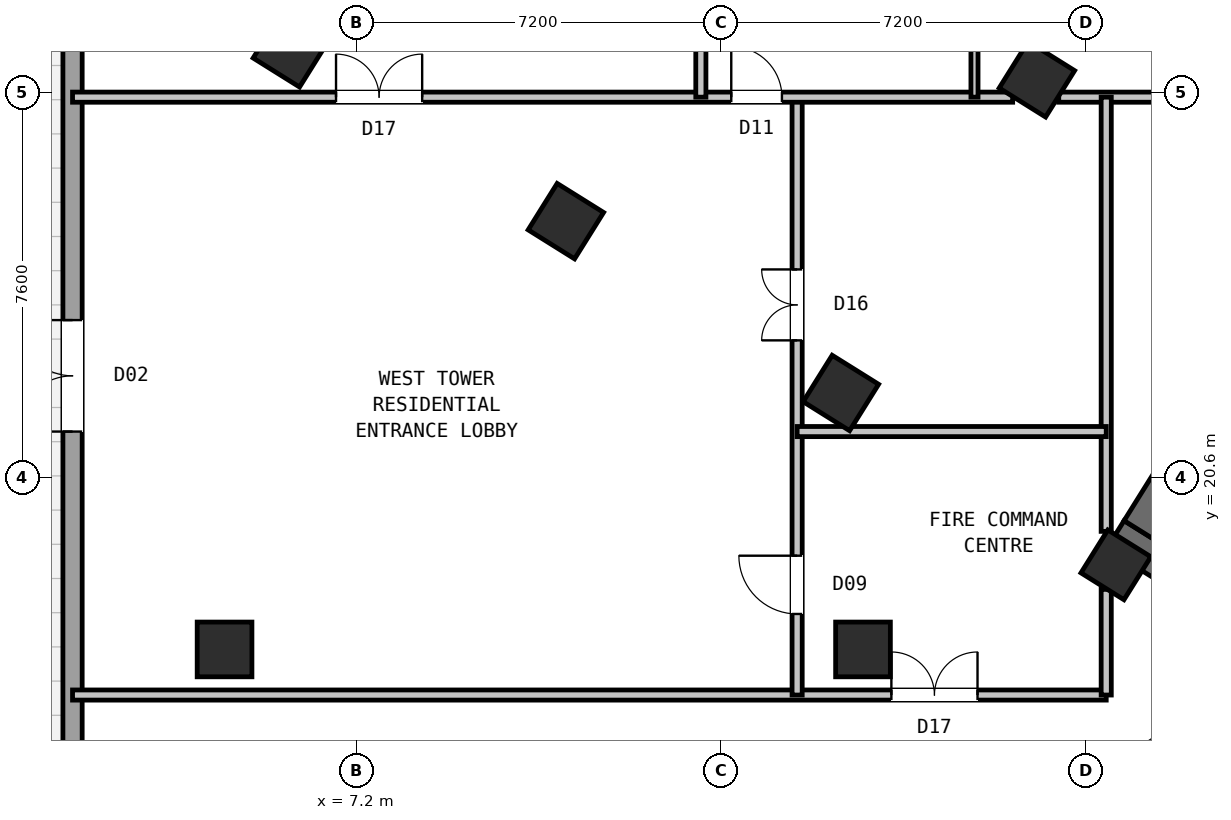
"""IFC4 building model, lengths in metres.
Left out: names, types, materials, properties, quantities, classifications, styles, units other than length and angle.
Written with IfcOpenShell. Run it as: python <this file> out.ifc"""

import sys

from ifc_helpers import new_model, si_unit, direction, frame, frame_2d, origin, origin_2d, place, context, subcontext, project, spatial, rectangle, hollow_rectangle, extrude, source, transform, mapped, element, fill, save


model = new_model("IFC4")
c1 = context("Model", 3, precision=1e-05, world=origin(), true_north=direction((0.0, 1.0)))
c2 = subcontext(c1, "Body", "Model", "MODEL_VIEW")
j1 = project(units=[si_unit("LENGTHUNIT", "METRE"), si_unit("PLANEANGLEUNIT", "RADIAN")], contexts=[c1])
p1 = place(None, origin())
s1 = spatial("IfcSite", under=j1, at=p1, CompositionType="ELEMENT")
p2 = place(p1, origin())
s2 = spatial("IfcBuilding", under=s1, at=p2, CompositionType="ELEMENT")
p3 = place(p2, origin())
s3 = spatial("IfcBuildingStorey", under=s2, at=p3, CompositionType="ELEMENT", Elevation=0.0)
p4 = place(p3, frame((33.409, 12.45, 0.0), z_axis=(0.0, 0.0, 1.0), x_axis=(-0.848051132073, 0.529914405721, 0.0)))
e1 = element("IfcWall", 1, at=p4, inside=s3, PredefinedType="SHEAR", context=c2, shape_type="SweptSolid", body=[
    extrude(rectangle(XDim=13.24, YDim=0.65, at=frame_2d((6.62, 0.0))), origin(), (0.0, 0.0, 1.0), 5.05),
])
p5 = place(p3, frame((26.007, 24.976, 0.0), z_axis=(0.0, 0.0, 1.0), x_axis=(-0.529916319127, -0.848049936456, 0.0)))
e2 = element("IfcWall", 2, at=p5, inside=s3, PredefinedType="SHEAR", context=c2, shape_type="SweptSolid", body=[
    extrude(rectangle(XDim=6.375, YDim=0.65, at=frame_2d((3.188, 0.0))), origin(), (0.0, 0.0, 1.0), 5.05),
])
m1 = source(origin(), c2, "Body", "SweptSolid", [
    extrude(hollow_rectangle(XDim=1.08, YDim=1.08, WallThickness=0.04, at=origin_2d()), origin(), (0.0, 0.0, 1.0), 5.4),
])
for number, where, z_axis, x_axis in (
    (3, (4.6, 17.2, 0.0), (0.0, 0.0, 1.0), (1.0, 0.0, 0.0)),
    (4, (17.2, 17.2, 0.0), (0.0, 0.0, 1.0), (1.0, 0.0, 0.0)),
    (5, (20.632, 28.452, 0.0), (0.0, 0.0, 1.0), (-0.848, 0.53, 0.0)),
    (6, (16.764, 22.261, 0.0), (0.0, 0.0, 1.0), (-0.848, 0.53, 0.0)),
    (7, (11.336, 25.653, 0.0), (0.0, 0.0, 1.0), (-0.848, 0.53, 0.0)),
    (8, (5.909, 29.044, 0.0), (0.0, 0.0, 1.0), (-0.848, 0.53, 0.0)),
):
    element("IfcColumn", number, at=place(p3, frame(where, z_axis=z_axis, x_axis=x_axis)), inside=s3, PredefinedType="COLUMN", context=c2, shape_type="MappedRepresentation", body=[
        mapped(m1, transform((0.0, 0.0, 0.0), scale=1.0)),
    ])
m2 = source(origin(), c2, "Body", "SweptSolid", [
    extrude(hollow_rectangle(XDim=1.0, YDim=1.0, WallThickness=0.04, at=origin_2d()), origin(), (0.0, 0.0, 1.0), 5.4),
])
p6 = place(p3, frame((22.191, 18.87, 0.0), z_axis=(0.0, 0.0, 1.0), x_axis=(-0.848048096156, 0.529919264233, 0.0)))
e9 = element("IfcColumn", 9, at=p6, inside=s3, PredefinedType="COLUMN", context=c2, shape_type="MappedRepresentation", body=[
    mapped(m2, transform((0.0, 0.0, 0.0), scale=1.0)),
])
p7 = place(p3, frame((1.6, 4.883, 0.0), z_axis=(0.0, 0.0, 1.0), x_axis=(0.0, 1.0, 0.0)))
e10 = element("IfcWall", 10, at=p7, inside=s3, PredefinedType="STANDARD", context=c2, shape_type="SweptSolid", body=[
    extrude(rectangle(XDim=38.234, YDim=0.38, at=frame_2d((19.117, 0.0))), origin(), (0.0, 0.0, 1.0), 5.05),
])
p8 = place(p7, frame((16.617, 0.0, 0.0)))
e11 = element("IfcOpeningElement", 11, at=p8, cuts=e10, PredefinedType="OPENING", context=c2, shape_type="SweptSolid", body=[
    extrude(rectangle(XDim=2.2, YDim=2.6, at=frame_2d((1.1, 1.3))), frame((0.0, 0.2, 0.0), z_axis=(0.0, -1.0, 0.0), x_axis=(1.0, 0.0, 0.0)), (0.0, 0.0, 1.0), 0.4),
])
p9 = place(p7, frame((28.317, 0.0, 0.0)))
e12 = element("IfcOpeningElement", 12, at=p9, cuts=e10, PredefinedType="OPENING", context=c2, shape_type="SweptSolid", body=[
    extrude(rectangle(XDim=1.6, YDim=2.4, at=frame_2d((0.8, 1.2))), frame((0.0, 0.2, 0.0), z_axis=(0.0, -1.0, 0.0), x_axis=(1.0, 0.0, 0.0)), (0.0, 0.0, 1.0), 0.4),
])
p10 = place(p3, frame((1.6, 16.3, 0.0), z_axis=(0.0, 0.0, 1.0), x_axis=(1.0, 0.0, 0.0)))
e13 = element("IfcWall", 13, at=p10, inside=s3, PredefinedType="STANDARD", context=c2, shape_type="SweptSolid", body=[
    extrude(rectangle(XDim=20.4, YDim=0.2, at=frame_2d((10.2, 0.0))), origin(), (0.0, 0.0, 1.0), 5.04),
])
p11 = place(p10, frame((16.16, 0.0, 0.0)))
e14 = element("IfcOpeningElement", 14, at=p11, cuts=e13, PredefinedType="OPENING", context=c2, shape_type="SweptSolid", body=[
    extrude(rectangle(XDim=1.7, YDim=2.2, at=frame_2d((0.85, 1.1))), frame((0.0, 0.11, 0.0), z_axis=(0.0, -1.0, 0.0), x_axis=(1.0, 0.0, 0.0)), (0.0, 0.0, 1.0), 0.22),
])
p12 = place(p3, frame((15.9, 16.3, 0.0), z_axis=(0.0, 0.0, 1.0), x_axis=(0.0, 1.0, 0.0)))
e15 = element("IfcWall", 15, at=p12, inside=s3, PredefinedType="STANDARD", context=c2, shape_type="SweptSolid", body=[
    extrude(rectangle(XDim=11.8, YDim=0.2, at=frame_2d((5.9, 0.0))), origin(), (0.0, 0.0, 1.0), 5.04),
])
p13 = place(p12, frame((1.6, 0.0, 0.0)))
e16 = element("IfcOpeningElement", 16, at=p13, cuts=e15, PredefinedType="OPENING", context=c2, shape_type="SweptSolid", body=[
    extrude(rectangle(XDim=1.15, YDim=2.1, at=frame_2d((0.575, 1.05))), frame((0.0, 0.11, 0.0), z_axis=(0.0, -1.0, 0.0), x_axis=(1.0, 0.0, 0.0)), (0.0, 0.0, 1.0), 0.22),
])
p14 = place(p12, frame((7.0, 0.0, 0.0)))
e17 = element("IfcOpeningElement", 17, at=p14, cuts=e15, PredefinedType="OPENING", context=c2, shape_type="SweptSolid", body=[
    extrude(rectangle(XDim=1.4, YDim=2.15, at=frame_2d((0.7, 1.075))), frame((0.0, 0.11, 0.0), z_axis=(0.0, -1.0, 0.0), x_axis=(1.0, 0.0, 0.0)), (0.0, 0.0, 1.0), 0.22),
])
p15 = place(p3, frame((1.6, 28.1, 0.0), z_axis=(0.0, 0.0, 1.0), x_axis=(1.0, 0.0, 0.0)))
e18 = element("IfcWall", 18, at=p15, inside=s3, PredefinedType="STANDARD", context=c2, shape_type="SweptSolid", body=[
    extrude(rectangle(XDim=18.554, YDim=0.2, at=frame_2d((9.277, 0.0))), origin(), (0.0, 0.0, 1.0), 5.04),
])
p16 = place(p15, frame((5.2, 0.0, 0.0)))
e19 = element("IfcOpeningElement", 19, at=p16, cuts=e18, PredefinedType="OPENING", context=c2, shape_type="SweptSolid", body=[
    extrude(rectangle(XDim=1.7, YDim=2.2, at=frame_2d((0.85, 1.1))), frame((0.0, 0.11, 0.0), z_axis=(0.0, -1.0, 0.0), x_axis=(1.0, 0.0, 0.0)), (0.0, 0.0, 1.0), 0.22),
])
p17 = place(p15, frame((13.0, 0.0, 0.0)))
e20 = element("IfcOpeningElement", 20, at=p17, cuts=e18, PredefinedType="OPENING", context=c2, shape_type="SweptSolid", body=[
    extrude(rectangle(XDim=1.0, YDim=2.1, at=frame_2d((0.5, 1.05))), frame((0.0, 0.11, 0.0), z_axis=(0.0, -1.0, 0.0), x_axis=(1.0, 0.0, 0.0)), (0.0, 0.0, 1.0), 0.22),
])
p18 = place(p3, frame((21.063, 28.1, 0.0), z_axis=(0.0, 0.0, 1.0), x_axis=(1.0, 0.0, 0.0)))
e21 = element("IfcWall", 21, at=p18, inside=s3, PredefinedType="STANDARD", context=c2, shape_type="SweptSolid", body=[
    extrude(rectangle(XDim=4.537, YDim=0.2, at=frame_2d((2.269, 0.0))), origin(), (0.0, 0.0, 1.0), 5.04),
])
p19 = place(p3, frame((22.0, 16.3, 0.0), z_axis=(0.0, 0.0, 1.0), x_axis=(0.0, 1.0, 0.0)))
e22 = element("IfcWall", 22, at=p19, inside=s3, PredefinedType="STANDARD", context=c2, shape_type="SweptSolid", body=[
    extrude(rectangle(XDim=2.085, YDim=0.2, at=frame_2d((1.043, 0.0))), origin(), (0.0, 0.0, 1.0), 5.04),
])
p20 = place(p3, frame((22.0, 19.53, 0.0), z_axis=(0.0, 0.0, 1.0), x_axis=(0.0, 1.0, 0.0)))
e23 = element("IfcWall", 23, at=p20, inside=s3, PredefinedType="STANDARD", context=c2, shape_type="SweptSolid", body=[
    extrude(rectangle(XDim=8.57, YDim=0.2, at=frame_2d((4.285, 0.0))), origin(), (0.0, 0.0, 1.0), 5.04),
])
p21 = place(p3, frame((15.9, 21.5, 0.0), z_axis=(0.0, 0.0, 1.0), x_axis=(1.0, 0.0, 0.0)))
e24 = element("IfcWall", 24, at=p21, inside=s3, PredefinedType="STANDARD", context=c2, shape_type="SweptSolid", body=[
    extrude(rectangle(XDim=6.1, YDim=0.2, at=frame_2d((3.05, 0.0))), origin(), (0.0, 0.0, 1.0), 5.04),
])
p22 = place(p3, frame((14.0, 28.1, 0.0), z_axis=(0.0, 0.0, 1.0), x_axis=(0.0, 1.0, 0.0)))
e25 = element("IfcWall", 25, at=p22, inside=s3, PredefinedType="STANDARD", context=c2, shape_type="SweptSolid", body=[
    extrude(rectangle(XDim=12.852, YDim=0.2, at=frame_2d((6.426, 0.0))), origin(), (0.0, 0.0, 1.0), 5.04),
])
p23 = place(p3, frame((19.4, 28.1, 0.0), z_axis=(0.0, 0.0, 1.0), x_axis=(0.0, 1.0, 0.0)))
e26 = element("IfcWall", 26, at=p23, inside=s3, PredefinedType="PLUMBINGWALL", context=c2, shape_type="SweptSolid", body=[
    extrude(rectangle(XDim=9.416, YDim=0.14, at=frame_2d((4.708, 0.0))), origin(), (0.0, 0.0, 1.0), 5.04),
])
p24 = place(p23, frame((1.13, 0.0, 0.0)))
e27 = element("IfcOpeningElement", 27, at=p24, cuts=e26, PredefinedType="OPENING", context=c2, shape_type="SweptSolid", body=[
    extrude(rectangle(XDim=0.88, YDim=2.08, at=frame_2d((0.44, 1.04))), frame((0.0, 0.08, 0.0), z_axis=(0.0, -1.0, 0.0), x_axis=(1.0, 0.0, 0.0)), (0.0, 0.0, 1.0), 0.16),
])
p25 = place(p23, frame((6.73, 0.0, 0.0)))
e28 = element("IfcOpeningElement", 28, at=p25, cuts=e26, PredefinedType="OPENING", context=c2, shape_type="SweptSolid", body=[
    extrude(rectangle(XDim=0.88, YDim=2.08, at=frame_2d((0.44, 1.04))), frame((0.0, 0.08, 0.0), z_axis=(0.0, -1.0, 0.0), x_axis=(1.0, 0.0, 0.0)), (0.0, 0.0, 1.0), 0.16),
])
m3 = source(origin(), c2, "Body", "SweptSolid", [
    extrude(rectangle(XDim=2.2, YDim=2.6, at=frame_2d((1.1, 1.3))), frame((0.0, 0.025, 0.0), z_axis=(0.0, -1.0, 0.0), x_axis=(1.0, 0.0, 0.0)), (0.0, 0.0, 1.0), 0.05),
])
p26 = place(p8, origin())
e29 = element("IfcDoor", 29, at=p26, inside=s3, OperationType="DOUBLE_DOOR_SINGLE_SWING", PredefinedType="DOOR", context=c2, shape_type="MappedRepresentation", body=[
    mapped(m3, transform((0.0, 0.0, 0.0), scale=1.0)),
])
fill(e11, e29)
m4 = source(origin(), c2, "Body", "SweptSolid", [
    extrude(rectangle(XDim=1.7, YDim=2.2, at=frame_2d((0.85, 1.1))), frame((0.0, 0.025, 0.0), z_axis=(0.0, -1.0, 0.0), x_axis=(1.0, 0.0, 0.0)), (0.0, 0.0, 1.0), 0.05),
])
p27 = place(p11, origin())
e30 = element("IfcDoor", 30, at=p27, inside=s3, OperationType="DOUBLE_DOOR_SINGLE_SWING", PredefinedType="DOOR", context=c2, shape_type="MappedRepresentation", body=[
    mapped(m4, transform((0.0, 0.0, 0.0), scale=1.0)),
])
fill(e14, e30)
m5 = source(origin(), c2, "Body", "SweptSolid", [
    extrude(rectangle(XDim=1.15, YDim=2.1, at=frame_2d((0.575, 1.05))), frame((0.0, 0.025, 0.0), z_axis=(0.0, -1.0, 0.0), x_axis=(1.0, 0.0, 0.0)), (0.0, 0.0, 1.0), 0.05),
])
p28 = place(p13, origin())
e31 = element("IfcDoor", 31, at=p28, inside=s3, OperationType="SINGLE_SWING_RIGHT", PredefinedType="DOOR", context=c2, shape_type="MappedRepresentation", body=[
    mapped(m5, transform((0.0, 0.0, 0.0), scale=1.0)),
])
fill(e16, e31)
m6 = source(origin(), c2, "Body", "SweptSolid", [
    extrude(rectangle(XDim=1.4, YDim=2.15, at=frame_2d((0.7, 1.075))), frame((0.0, 0.025, 0.0), z_axis=(0.0, -1.0, 0.0), x_axis=(1.0, 0.0, 0.0)), (0.0, 0.0, 1.0), 0.05),
])
p29 = place(p14, origin())
e32 = element("IfcDoor", 32, at=p29, inside=s3, OperationType="DOUBLE_DOOR_SINGLE_SWING", PredefinedType="DOOR", context=c2, shape_type="MappedRepresentation", body=[
    mapped(m6, transform((0.0, 0.0, 0.0), scale=1.0)),
])
fill(e17, e32)
p30 = place(p16, origin())
e33 = element("IfcDoor", 33, at=p30, inside=s3, OperationType="DOUBLE_DOOR_SINGLE_SWING", PredefinedType="DOOR", context=c2, shape_type="MappedRepresentation", body=[
    mapped(m4, transform((0.0, 0.0, 0.0), scale=1.0)),
])
fill(e19, e33)
m7 = source(origin(), c2, "Body", "SweptSolid", [
    extrude(rectangle(XDim=1.0, YDim=2.1, at=frame_2d((0.5, 1.05))), frame((0.0, 0.025, 0.0), z_axis=(0.0, -1.0, 0.0), x_axis=(1.0, 0.0, 0.0)), (0.0, 0.0, 1.0), 0.05),
])
p31 = place(p17, origin())
e34 = element("IfcDoor", 34, at=p31, inside=s3, OperationType="SINGLE_SWING_LEFT", PredefinedType="DOOR", context=c2, shape_type="MappedRepresentation", body=[
    mapped(m7, transform((0.0, 0.0, 0.0), scale=1.0)),
])
fill(e20, e34)
save(model, sys.argv[1])
